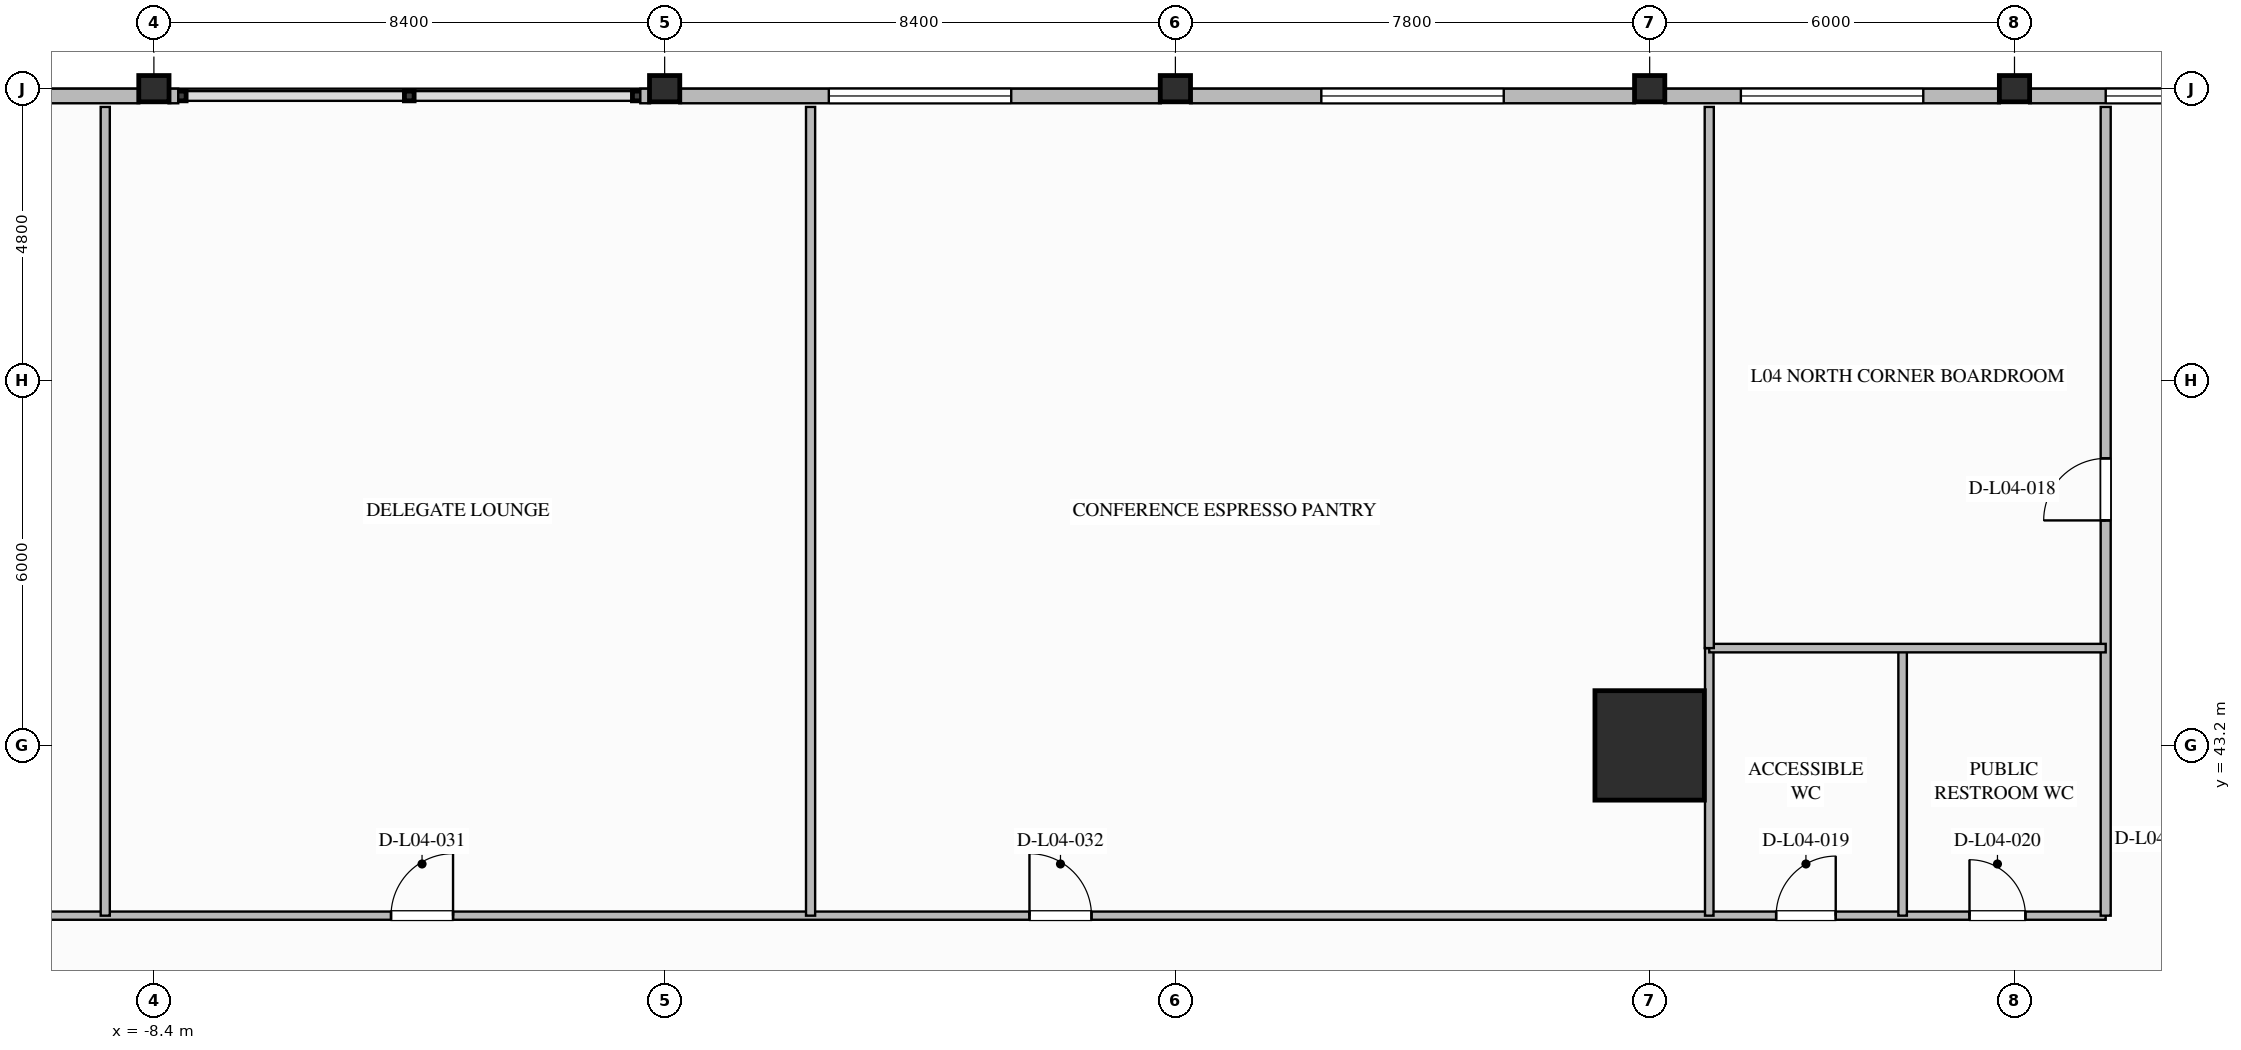
"""IFC4 building model, lengths in metres.
Left out: names, types, materials, properties, quantities, classifications, styles, units other than length and angle.
Written with IfcOpenShell. Run it as: python <this file> out.ifc"""

import sys

from ifc_helpers import new_model, si_unit, direction, frame, frame_2d, origin, origin_2d, place, context, subcontext, project, spatial, rectangle, i_section, extrude, element, fill, save


model = new_model("IFC4")
c1 = context("Model", 3, precision=1e-05, world=origin(), true_north=direction((0.0, 1.0)))
c2 = subcontext(c1, "Body", "Model", "MODEL_VIEW")
j1 = project(units=[si_unit("LENGTHUNIT", "METRE"), si_unit("PLANEANGLEUNIT", "RADIAN")], contexts=[c1])
p1 = place(None, origin())
s1 = spatial("IfcSite", under=j1, at=p1, CompositionType="ELEMENT")
p2 = place(p1, origin())
s2 = spatial("IfcBuilding", under=s1, at=p2, CompositionType="ELEMENT")
p3 = place(p2, frame((0.0, 0.0, 22.4)))
s3 = spatial("IfcBuildingStorey", under=s2, at=p3, CompositionType="ELEMENT", Elevation=22.4)
p4 = place(p3, frame((16.2, 43.2, 0.0), z_axis=(0.0, 0.0, 1.0), x_axis=(1.0, 0.0, 0.0)))
e1 = element("IfcColumn", 1, at=p4, inside=s3, PredefinedType="COLUMN", context=c2, shape_type="SweptSolid", body=[
    extrude(rectangle(XDim=1.8, YDim=1.8, at=origin_2d()), origin(), (0.0, 0.0, 1.0), 5.2),
])
for number, where, z_axis, x_axis in (
    (2, (-8.4, 54.0, 0.0), (0.0, 0.0, 1.0), (0.0, 1.0, 0.0)),
    (3, (0.0, 54.0, 0.0), (0.0, 0.0, 1.0), (0.0, 1.0, 0.0)),
    (4, (8.4, 54.0, 0.0), (0.0, 0.0, 1.0), (0.0, 1.0, 0.0)),
    (5, (16.2, 54.0, 0.0), (0.0, 0.0, 1.0), (0.0, 1.0, 0.0)),
    (6, (22.2, 54.0, 0.0), (0.0, 0.0, 1.0), (0.0, 1.0, 0.0)),
):
    element("IfcColumn", number, at=place(p3, frame(where, z_axis=z_axis, x_axis=x_axis)), inside=s3, PredefinedType="COLUMN", context=c2, shape_type="SweptSolid", body=[
        extrude(i_section(OverallWidth=0.432, OverallDepth=0.498, WebThickness=0.056, FlangeThickness=0.089, FilletRadius=0.03, at=origin_2d()), origin(), (0.0, 0.0, 1.0), 5.2),
    ])
p5 = place(p3, frame((-15.959, 53.88, 0.0), z_axis=(0.0, 0.0, 1.0), x_axis=(1.0, 0.0, 0.0)))
e7 = element("IfcWall", 7, at=p5, inside=s3, PredefinedType="STANDARD", context=c2, shape_type="SweptSolid", body=[
    extrude(rectangle(XDim=7.318, YDim=0.24, at=frame_2d((3.659, 0.0))), origin(), (0.0, 0.0, 1.0), 4.155),
])
p6 = place(p5, frame((2.159, 0.0, 0.65)))
e8 = element("IfcOpeningElement", 8, at=p6, cuts=e7, PredefinedType="OPENING", context=c2, shape_type="SweptSolid", body=[
    extrude(rectangle(XDim=3.0, YDim=2.2, at=frame_2d((1.5, 1.1))), frame((0.0, 0.13, 0.0), z_axis=(0.0, -1.0, 0.0), x_axis=(1.0, 0.0, 0.0)), (0.0, 0.0, 1.0), 0.26),
])
p7 = place(p3, frame((-8.159, 53.88, 0.0), z_axis=(0.0, 0.0, 1.0), x_axis=(1.0, 0.0, 0.0)))
e9 = element("IfcWall", 9, at=p7, inside=s3, PredefinedType="STANDARD", context=c2, shape_type="SweptSolid", body=[
    extrude(rectangle(XDim=0.159, YDim=0.24, at=frame_2d((0.08, 0.0))), origin(), (0.0, 0.0, 1.0), 4.85),
])
p8 = place(p3, frame((-0.4, 53.88, 0.0), z_axis=(0.0, 0.0, 1.0), x_axis=(1.0, 0.0, 0.0)))
e10 = element("IfcWall", 10, at=p8, inside=s3, PredefinedType="STANDARD", context=c2, shape_type="SweptSolid", body=[
    extrude(rectangle(XDim=0.159, YDim=0.24, at=frame_2d((0.08, 0.0))), origin(), (0.0, 0.0, 1.0), 4.85),
])
p9 = place(p3, frame((0.241, 53.88, 0.0), z_axis=(0.0, 0.0, 1.0), x_axis=(1.0, 0.0, 0.0)))
e11 = element("IfcWall", 11, at=p9, inside=s3, PredefinedType="STANDARD", context=c2, shape_type="SweptSolid", body=[
    extrude(rectangle(XDim=7.918, YDim=0.24, at=frame_2d((3.959, 0.0))), origin(), (0.0, 0.0, 1.0), 4.155),
])
p10 = place(p9, frame((2.459, 0.0, 0.65)))
e12 = element("IfcOpeningElement", 12, at=p10, cuts=e11, PredefinedType="OPENING", context=c2, shape_type="SweptSolid", body=[
    extrude(rectangle(XDim=3.0, YDim=2.2, at=frame_2d((1.5, 1.1))), frame((0.0, 0.13, 0.0), z_axis=(0.0, -1.0, 0.0), x_axis=(1.0, 0.0, 0.0)), (0.0, 0.0, 1.0), 0.26),
])
p11 = place(p3, frame((8.641, 53.88, 0.0), z_axis=(0.0, 0.0, 1.0), x_axis=(1.0, 0.0, 0.0)))
e13 = element("IfcWall", 13, at=p11, inside=s3, PredefinedType="STANDARD", context=c2, shape_type="SweptSolid", body=[
    extrude(rectangle(XDim=7.318, YDim=0.24, at=frame_2d((3.659, 0.0))), origin(), (0.0, 0.0, 1.0), 4.155),
])
p12 = place(p11, frame((2.159, 0.0, 0.65)))
e14 = element("IfcOpeningElement", 14, at=p12, cuts=e13, PredefinedType="OPENING", context=c2, shape_type="SweptSolid", body=[
    extrude(rectangle(XDim=3.0, YDim=2.2, at=frame_2d((1.5, 1.1))), frame((0.0, 0.13, 0.0), z_axis=(0.0, -1.0, 0.0), x_axis=(1.0, 0.0, 0.0)), (0.0, 0.0, 1.0), 0.26),
])
p13 = place(p3, frame((16.441, 53.88, 0.0), z_axis=(0.0, 0.0, 1.0), x_axis=(1.0, 0.0, 0.0)))
e15 = element("IfcWall", 15, at=p13, inside=s3, PredefinedType="STANDARD", context=c2, shape_type="SweptSolid", body=[
    extrude(rectangle(XDim=5.518, YDim=0.24, at=frame_2d((2.759, 0.0))), origin(), (0.0, 0.0, 1.0), 4.155),
])
p14 = place(p13, frame((1.259, 0.0, 0.65)))
e16 = element("IfcOpeningElement", 16, at=p14, cuts=e15, PredefinedType="OPENING", context=c2, shape_type="SweptSolid", body=[
    extrude(rectangle(XDim=3.0, YDim=2.2, at=frame_2d((1.5, 1.1))), frame((0.0, 0.13, 0.0), z_axis=(0.0, -1.0, 0.0), x_axis=(1.0, 0.0, 0.0)), (0.0, 0.0, 1.0), 0.26),
])
p15 = place(p3, frame((22.441, 53.88, 0.0), z_axis=(0.0, 0.0, 1.0), x_axis=(1.0, 0.0, 0.0)))
e17 = element("IfcWall", 17, at=p15, inside=s3, PredefinedType="STANDARD", context=c2, shape_type="SweptSolid", body=[
    extrude(rectangle(XDim=4.318, YDim=0.24, at=frame_2d((2.159, 0.0))), origin(), (0.0, 0.0, 1.0), 4.155),
])
p16 = place(p15, frame((1.259, 0.0, 0.65)))
e18 = element("IfcOpeningElement", 18, at=p16, cuts=e17, PredefinedType="OPENING", context=c2, shape_type="SweptSolid", body=[
    extrude(rectangle(XDim=1.8, YDim=2.2, at=frame_2d((0.9, 1.1))), frame((0.0, 0.13, 0.0), z_axis=(0.0, -1.0, 0.0), x_axis=(1.0, 0.0, 0.0)), (0.0, 0.0, 1.0), 0.26),
])
p17 = place(p3, frame((-23.6, 40.4, 0.0), z_axis=(0.0, 0.0, 1.0), x_axis=(1.0, 0.0, 0.0)))
e19 = element("IfcWall", 19, at=p17, inside=s3, PredefinedType="PARTITIONING", context=c2, shape_type="SweptSolid", body=[
    extrude(rectangle(XDim=47.3, YDim=0.135, at=frame_2d((23.65, 0.0))), origin(), (0.0, 0.0, 1.0), 4.85),
])
p18 = place(p17, frame((41.88, 0.0, 0.0)))
e20 = element("IfcOpeningElement", 20, at=p18, cuts=e19, PredefinedType="OPENING", context=c2, shape_type="SweptSolid", body=[
    extrude(rectangle(XDim=0.98, YDim=2.1, at=frame_2d((0.49, 1.05))), frame((0.0, 0.077, 0.0), z_axis=(0.0, -1.0, 0.0), x_axis=(1.0, 0.0, 0.0)), (0.0, 0.0, 1.0), 0.155),
])
p19 = place(p17, frame((45.06, 0.0, 0.0)))
e21 = element("IfcOpeningElement", 21, at=p19, cuts=e19, PredefinedType="OPENING", context=c2, shape_type="SweptSolid", body=[
    extrude(rectangle(XDim=0.92, YDim=2.1, at=frame_2d((0.46, 1.05))), frame((0.0, 0.077, 0.0), z_axis=(0.0, -1.0, 0.0), x_axis=(1.0, 0.0, 0.0)), (0.0, 0.0, 1.0), 0.155),
])
p20 = place(p17, frame((10.6, 0.0, 0.0)))
e22 = element("IfcOpeningElement", 22, at=p20, cuts=e19, PredefinedType="OPENING", context=c2, shape_type="SweptSolid", body=[
    extrude(rectangle(XDim=1.02, YDim=2.15, at=frame_2d((0.51, 1.075))), frame((0.0, 0.077, 0.0), z_axis=(0.0, -1.0, 0.0), x_axis=(1.0, 0.0, 0.0)), (0.0, 0.0, 1.0), 0.155),
])
p21 = place(p17, frame((19.1, 0.0, 0.0)))
e23 = element("IfcOpeningElement", 23, at=p21, cuts=e19, PredefinedType="OPENING", context=c2, shape_type="SweptSolid", body=[
    extrude(rectangle(XDim=1.02, YDim=2.15, at=frame_2d((0.51, 1.075))), frame((0.0, 0.077, 0.0), z_axis=(0.0, -1.0, 0.0), x_axis=(1.0, 0.0, 0.0)), (0.0, 0.0, 1.0), 0.155),
])
p22 = place(p17, frame((29.6, 0.0, 0.0)))
e24 = element("IfcOpeningElement", 24, at=p22, cuts=e19, PredefinedType="OPENING", context=c2, shape_type="SweptSolid", body=[
    extrude(rectangle(XDim=1.02, YDim=2.15, at=frame_2d((0.51, 1.075))), frame((0.0, 0.077, 0.0), z_axis=(0.0, -1.0, 0.0), x_axis=(1.0, 0.0, 0.0)), (0.0, 0.0, 1.0), 0.155),
])
p23 = place(p3, frame((23.7, 40.4, 0.0), z_axis=(0.0, 0.0, 1.0), x_axis=(0.0, 1.0, 0.0)))
e25 = element("IfcWall", 25, at=p23, inside=s3, PredefinedType="PARTITIONING", context=c2, shape_type="SweptSolid", body=[
    extrude(rectangle(XDim=13.3, YDim=0.165, at=frame_2d((6.65, 0.0))), origin(), (0.0, 0.0, 1.0), 4.85),
])
p24 = place(p23, frame((6.5, 0.0, 0.0)))
e26 = element("IfcOpeningElement", 26, at=p24, cuts=e25, PredefinedType="OPENING", context=c2, shape_type="SweptSolid", body=[
    extrude(rectangle(XDim=1.02, YDim=2.15, at=frame_2d((0.51, 1.075))), frame((0.0, 0.093, 0.0), z_axis=(0.0, -1.0, 0.0), x_axis=(1.0, 0.0, 0.0)), (0.0, 0.0, 1.0), 0.185),
])
for number, where, z_axis, x_axis in (
    (27, (17.18, 40.4, 0.0), (0.0, 0.0, 1.0), (0.0, 1.0, 0.0)),
    (28, (20.36, 40.4, 0.0), (0.0, 0.0, 1.0), (0.0, 1.0, 0.0)),
):
    element("IfcWall", number, at=place(p3, frame(where, z_axis=z_axis, x_axis=x_axis)), inside=s3, PredefinedType="PLUMBINGWALL", context=c2, shape_type="SweptSolid", body=[
        extrude(rectangle(XDim=4.4, YDim=0.14, at=frame_2d((2.2, 0.0))), origin(), (0.0, 0.0, 1.0), 4.85),
    ])
p25 = place(p3, frame((17.18, 44.8, 0.0), z_axis=(0.0, 0.0, 1.0), x_axis=(1.0, 0.0, 0.0)))
e29 = element("IfcWall", 29, at=p25, inside=s3, PredefinedType="PLUMBINGWALL", context=c2, shape_type="SweptSolid", body=[
    extrude(rectangle(XDim=6.52, YDim=0.14, at=frame_2d((3.26, 0.0))), origin(), (0.0, 0.0, 1.0), 4.85),
])
p26 = place(p3, frame((17.18, 44.8, 0.0), z_axis=(0.0, 0.0, 1.0), x_axis=(0.0, 1.0, 0.0)))
e30 = element("IfcWall", 30, at=p26, inside=s3, PredefinedType="PARTITIONING", context=c2, shape_type="SweptSolid", body=[
    extrude(rectangle(XDim=8.9, YDim=0.15, at=frame_2d((4.45, 0.0))), origin(), (0.0, 0.0, 1.0), 4.85),
])
for number, where, z_axis, x_axis in (
    (31, (-9.2, 40.4, 0.0), (0.0, 0.0, 1.0), (0.0, 1.0, 0.0)),
    (32, (2.4, 40.4, 0.0), (0.0, 0.0, 1.0), (0.0, 1.0, 0.0)),
):
    element("IfcWall", number, at=place(p3, frame(where, z_axis=z_axis, x_axis=x_axis)), inside=s3, PredefinedType="PARTITIONING", context=c2, shape_type="SweptSolid", body=[
        extrude(rectangle(XDim=13.3, YDim=0.15, at=frame_2d((6.65, 0.0))), origin(), (0.0, 0.0, 1.0), 4.85),
    ])
p27 = place(p10, origin())
e33 = element("IfcWindow", 33, at=p27, inside=s3, PartitioningType="SINGLE_PANEL", PredefinedType="WINDOW", context=c2, shape_type="SweptSolid", body=[
    extrude(rectangle(XDim=3.0, YDim=2.2, at=frame_2d((1.5, 1.1))), frame((0.0, 0.03, 0.0), z_axis=(0.0, -1.0, 0.0), x_axis=(1.0, 0.0, 0.0)), (0.0, 0.0, 1.0), 0.06),
])
fill(e12, e33)
p28 = place(p12, origin())
e34 = element("IfcWindow", 34, at=p28, inside=s3, PartitioningType="SINGLE_PANEL", PredefinedType="WINDOW", context=c2, shape_type="SweptSolid", body=[
    extrude(rectangle(XDim=3.0, YDim=2.2, at=frame_2d((1.5, 1.1))), frame((0.0, 0.03, 0.0), z_axis=(0.0, -1.0, 0.0), x_axis=(1.0, 0.0, 0.0)), (0.0, 0.0, 1.0), 0.06),
])
fill(e14, e34)
p29 = place(p14, origin())
e35 = element("IfcWindow", 35, at=p29, inside=s3, PartitioningType="SINGLE_PANEL", PredefinedType="WINDOW", context=c2, shape_type="SweptSolid", body=[
    extrude(rectangle(XDim=3.0, YDim=2.2, at=frame_2d((1.5, 1.1))), frame((0.0, 0.03, 0.0), z_axis=(0.0, -1.0, 0.0), x_axis=(1.0, 0.0, 0.0)), (0.0, 0.0, 1.0), 0.06),
])
fill(e16, e35)
p30 = place(p16, origin())
e36 = element("IfcWindow", 36, at=p30, inside=s3, PartitioningType="SINGLE_PANEL", PredefinedType="WINDOW", context=c2, shape_type="SweptSolid", body=[
    extrude(rectangle(XDim=1.8, YDim=2.2, at=frame_2d((0.9, 1.1))), frame((0.0, 0.03, 0.0), z_axis=(0.0, -1.0, 0.0), x_axis=(1.0, 0.0, 0.0)), (0.0, 0.0, 1.0), 0.06),
])
fill(e18, e36)
p31 = place(p24, origin())
e37 = element("IfcDoor", 37, at=p31, inside=s3, OperationType="SINGLE_SWING_LEFT", PredefinedType="DOOR", context=c2, shape_type="SweptSolid", body=[
    extrude(rectangle(XDim=1.02, YDim=2.15, at=frame_2d((0.51, 1.075))), frame((0.0, 0.025, 0.0), z_axis=(0.0, -1.0, 0.0), x_axis=(1.0, 0.0, 0.0)), (0.0, 0.0, 1.0), 0.05),
])
fill(e26, e37)
p32 = place(p18, origin())
e38 = element("IfcDoor", 38, at=p32, inside=s3, OperationType="SINGLE_SWING_RIGHT", PredefinedType="DOOR", context=c2, shape_type="SweptSolid", body=[
    extrude(rectangle(XDim=0.98, YDim=2.1, at=frame_2d((0.49, 1.05))), frame((0.0, 0.025, 0.0), z_axis=(0.0, -1.0, 0.0), x_axis=(1.0, 0.0, 0.0)), (0.0, 0.0, 1.0), 0.05),
])
fill(e20, e38)
p33 = place(p19, origin())
e39 = element("IfcDoor", 39, at=p33, inside=s3, OperationType="SINGLE_SWING_LEFT", PredefinedType="DOOR", context=c2, shape_type="SweptSolid", body=[
    extrude(rectangle(XDim=0.92, YDim=2.1, at=frame_2d((0.46, 1.05))), frame((0.0, 0.025, 0.0), z_axis=(0.0, -1.0, 0.0), x_axis=(1.0, 0.0, 0.0)), (0.0, 0.0, 1.0), 0.05),
])
fill(e21, e39)
p34 = place(p21, origin())
e40 = element("IfcDoor", 40, at=p34, inside=s3, OperationType="SINGLE_SWING_RIGHT", PredefinedType="DOOR", context=c2, shape_type="SweptSolid", body=[
    extrude(rectangle(XDim=1.02, YDim=2.15, at=frame_2d((0.51, 1.075))), frame((0.0, 0.025, 0.0), z_axis=(0.0, -1.0, 0.0), x_axis=(1.0, 0.0, 0.0)), (0.0, 0.0, 1.0), 0.05),
])
fill(e23, e40)
p35 = place(p22, origin())
e41 = element("IfcDoor", 41, at=p35, inside=s3, OperationType="SINGLE_SWING_LEFT", PredefinedType="DOOR", context=c2, shape_type="SweptSolid", body=[
    extrude(rectangle(XDim=1.02, YDim=2.15, at=frame_2d((0.51, 1.075))), frame((0.0, 0.025, 0.0), z_axis=(0.0, -1.0, 0.0), x_axis=(1.0, 0.0, 0.0)), (0.0, 0.0, 1.0), 0.05),
])
fill(e24, e41)
save(model, sys.argv[1])
